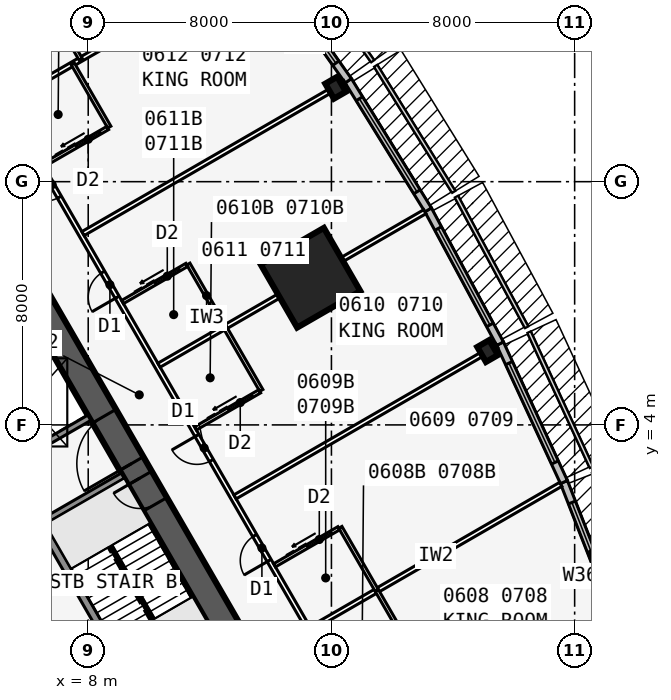
"""IFC4 building model, lengths in metres.
Left out: names, types, materials, properties, quantities, classifications, styles, units other than length and angle.
Written with IfcOpenShell. Run it as: python <this file> out.ifc"""

import sys

from ifc_helpers import new_model, si_unit, direction, frame, frame_2d, origin, origin_2d, place, context, subcontext, project, spatial, rectangle, i_section, extrude, element, fill, save


model = new_model("IFC4")
c1 = context("Model", 3, precision=1e-05, world=origin(), true_north=direction((0.0, 1.0)))
c2 = subcontext(c1, "Body", "Model", "MODEL_VIEW")
j1 = project(units=[si_unit("LENGTHUNIT", "METRE"), si_unit("PLANEANGLEUNIT", "RADIAN")], contexts=[c1])
p1 = place(None, origin())
s1 = spatial("IfcSite", under=j1, at=p1, CompositionType="ELEMENT")
p2 = place(p1, origin())
s2 = spatial("IfcBuilding", under=s1, at=p2, CompositionType="ELEMENT")
p3 = place(p2, frame((0.0, 0.0, 31.9)))
s3 = spatial("IfcBuildingStorey", under=s2, at=p3, CompositionType="ELEMENT", Elevation=31.9)
p4 = place(p3, frame((16.5, -9.526, 0.0), z_axis=(0.0, 0.0, 1.0), x_axis=(-0.499999749417, 0.866025548458, 0.0)))
e1 = element("IfcWall", 1, at=p4, inside=s3, PredefinedType="SHEAR", context=c2, shape_type="SweptSolid", body=[
    extrude(rectangle(XDim=33.0, YDim=0.9, at=frame_2d((16.5, 0.0))), origin(), (0.0, 0.0, 1.0), 3.4),
])
p5 = place(p4, frame((14.15, 0.0, 0.0)))
e2 = element("IfcOpeningElement", 2, at=p5, cuts=e1, PredefinedType="OPENING", context=c2, shape_type="SweptSolid", body=[
    extrude(rectangle(XDim=1.8, YDim=2.13, at=frame_2d((0.9, 1.065))), frame((0.0, 0.46, 0.0), z_axis=(0.0, -1.0, 0.0), x_axis=(1.0, 0.0, 0.0)), (0.0, 0.0, 1.0), 0.92),
])
p6 = place(p4, frame((12.6, 0.0, 0.0)))
e3 = element("IfcOpeningElement", 3, at=p6, cuts=e1, PredefinedType="OPENING", context=c2, shape_type="SweptSolid", body=[
    extrude(rectangle(XDim=1.0, YDim=2.13, at=frame_2d((0.5, 1.065))), frame((0.0, 0.46, 0.0), z_axis=(0.0, -1.0, 0.0), x_axis=(1.0, 0.0, 0.0)), (0.0, 0.0, 1.0), 0.92),
])
p7 = place(p3, frame((10.245, -5.843, 0.0), z_axis=(0.0, 0.0, 1.0), x_axis=(-0.499993009313, 0.866029439822, 0.0)))
e4 = element("IfcWall", 4, at=p7, inside=s3, PredefinedType="SOLIDWALL", context=c2, shape_type="SweptSolid", body=[
    extrude(rectangle(XDim=7.733, YDim=0.25, at=frame_2d((3.866, 0.0))), origin(), (0.0, 0.0, 1.0), 3.235),
])
for number, where, z_axis, x_axis in (
    (5, (6.429, 0.767, 0.0), (0.0, 0.0, 1.0), (0.866, 0.5, 0.0)),
    (6, (5.329, 2.673, 0.0), (0.0, 0.0, 1.0), (0.866, 0.5, 0.0)),
):
    element("IfcWall", number, at=place(p3, frame(where, z_axis=z_axis, x_axis=x_axis)), inside=s3, PredefinedType="SOLIDWALL", context=c2, shape_type="SweptSolid", body=[
        extrude(rectangle(XDim=3.125, YDim=0.2, at=frame_2d((1.562, 0.0))), origin(), (0.0, 0.0, 1.0), 3.235),
    ])
for number, where, z_axis, x_axis in (
    (7, (21.137, 6.43, 0.0), (0.0, 0.0, 1.0), (0.866, 0.5, 0.0)),
    (8, (16.137, 15.09, 0.0), (0.0, 0.0, 1.0), (0.866, 0.5, 0.0)),
):
    element("IfcColumn", number, at=place(p3, frame(where, z_axis=z_axis, x_axis=x_axis)), inside=s3, PredefinedType="COLUMN", context=c2, shape_type="SweptSolid", body=[
        extrude(i_section(OverallWidth=0.455, OverallDepth=0.569, WebThickness=0.078, FlangeThickness=0.125, at=origin_2d()), origin(), (0.0, 0.0, 1.0), 3.4),
    ])
p8 = place(p3, frame((15.312, 8.84, 0.0), z_axis=(0.0, 0.0, 1.0), x_axis=(0.866025403784, 0.5, 0.0)))
e9 = element("IfcColumn", 9, at=p8, inside=s3, PredefinedType="COLUMN", context=c2, shape_type="SweptSolid", body=[
    extrude(rectangle(XDim=2.4, YDim=2.4, at=origin_2d()), origin(), (0.0, 0.0, 1.0), 3.4),
])
p9 = place(p3, frame((25.486, -2.584, 0.0), z_axis=(0.0, 0.0, 1.0), x_axis=(-0.364013463868, 0.931393685894, 0.0)))
e10 = element("IfcWall", 10, at=p9, inside=s3, PredefinedType="STANDARD", context=c2, shape_type="SweptSolid", body=[
    extrude(rectangle(XDim=5.058, YDim=0.25, at=frame_2d((2.529, 0.0))), origin(), (0.0, 0.0, 1.0), 3.235),
])
p10 = place(p9, frame((0.729, 0.0, 0.45)))
e11 = element("IfcOpeningElement", 11, at=p10, cuts=e10, PredefinedType="OPENING", context=c2, shape_type="SweptSolid", body=[
    extrude(rectangle(XDim=3.6, YDim=2.4, at=frame_2d((1.8, 1.2))), frame((0.0, 0.135, 0.0), z_axis=(0.0, -1.0, 0.0), x_axis=(1.0, 0.0, 0.0)), (0.0, 0.0, 1.0), 0.27),
])
p11 = place(p3, frame((23.648, 2.119, 0.0), z_axis=(0.0, 0.0, 1.0), x_axis=(-0.419203100754, 0.907892482796, 0.0)))
e12 = element("IfcWall", 12, at=p11, inside=s3, PredefinedType="STANDARD", context=c2, shape_type="SweptSolid", body=[
    extrude(rectangle(XDim=5.021, YDim=0.25, at=frame_2d((2.51, 0.0))), origin(), (0.0, 0.0, 1.0), 3.235),
])
p12 = place(p11, frame((0.71, 0.0, 0.45)))
e13 = element("IfcOpeningElement", 13, at=p12, cuts=e12, PredefinedType="OPENING", context=c2, shape_type="SweptSolid", body=[
    extrude(rectangle(XDim=3.6, YDim=2.4, at=frame_2d((1.8, 1.2))), frame((0.0, 0.135, 0.0), z_axis=(0.0, -1.0, 0.0), x_axis=(1.0, 0.0, 0.0)), (0.0, 0.0, 1.0), 0.27),
])
p13 = place(p3, frame((21.547, 6.671, 0.0), z_axis=(0.0, 0.0, 1.0), x_axis=(-0.473412820489, 0.880840678782, 0.0)))
e14 = element("IfcWall", 14, at=p13, inside=s3, PredefinedType="STANDARD", context=c2, shape_type="SweptSolid", body=[
    extrude(rectangle(XDim=5.002, YDim=0.25, at=frame_2d((2.501, 0.0))), origin(), (0.0, 0.0, 1.0), 3.235),
])
p14 = place(p13, frame((0.701, 0.0, 0.45)))
e15 = element("IfcOpeningElement", 15, at=p14, cuts=e14, PredefinedType="OPENING", context=c2, shape_type="SweptSolid", body=[
    extrude(rectangle(XDim=3.6, YDim=2.4, at=frame_2d((1.8, 1.2))), frame((0.0, 0.135, 0.0), z_axis=(0.0, -1.0, 0.0), x_axis=(1.0, 0.0, 0.0)), (0.0, 0.0, 1.0), 0.27),
])
p15 = place(p3, frame((19.182, 11.071, 0.0), z_axis=(0.0, 0.0, 1.0), x_axis=(-0.526132807704, 0.850402415717, 0.0)))
e16 = element("IfcWall", 16, at=p15, inside=s3, PredefinedType="STANDARD", context=c2, shape_type="SweptSolid", body=[
    extrude(rectangle(XDim=5.002, YDim=0.25, at=frame_2d((2.501, 0.0))), origin(), (0.0, 0.0, 1.0), 3.235),
])
p16 = place(p15, frame((0.701, 0.0, 0.45)))
e17 = element("IfcOpeningElement", 17, at=p16, cuts=e16, PredefinedType="OPENING", context=c2, shape_type="SweptSolid", body=[
    extrude(rectangle(XDim=3.6, YDim=2.4, at=frame_2d((1.8, 1.2))), frame((0.0, 0.135, 0.0), z_axis=(0.0, -1.0, 0.0), x_axis=(1.0, 0.0, 0.0)), (0.0, 0.0, 1.0), 0.27),
])
p17 = place(p3, frame((16.555, 15.318, 0.0), z_axis=(0.0, 0.0, 1.0), x_axis=(-0.5766431066, 0.81699616132, 0.0)))
e18 = element("IfcWall", 18, at=p17, inside=s3, PredefinedType="STANDARD", context=c2, shape_type="SweptSolid", body=[
    extrude(rectangle(XDim=5.021, YDim=0.25, at=frame_2d((2.51, 0.0))), origin(), (0.0, 0.0, 1.0), 3.235),
])
p18 = place(p17, frame((0.71, 0.0, 0.45)))
e19 = element("IfcOpeningElement", 19, at=p18, cuts=e18, PredefinedType="OPENING", context=c2, shape_type="SweptSolid", body=[
    extrude(rectangle(XDim=3.6, YDim=2.4, at=frame_2d((1.8, 1.2))), frame((0.0, 0.135, 0.0), z_axis=(0.0, -1.0, 0.0), x_axis=(1.0, 0.0, 0.0)), (0.0, 0.0, 1.0), 0.27),
])
p19 = place(p3, frame((20.027, -10.985, 0.0), z_axis=(0.0, 0.0, 1.0), x_axis=(-0.500001677587, 0.866024435227, 0.0)))
e20 = element("IfcWall", 20, at=p19, inside=s3, PredefinedType="PARTITIONING", context=c2, shape_type="SweptSolid", body=[
    extrude(rectangle(XDim=39.054, YDim=0.15, at=frame_2d((19.527, 0.0))), origin(), (0.0, 0.0, 1.0), 3.235),
])
p20 = place(p19, frame((0.352, 0.0, 0.0)))
e21 = element("IfcOpeningElement", 21, at=p20, cuts=e20, PredefinedType="OPENING", context=c2, shape_type="SweptSolid", body=[
    extrude(rectangle(XDim=0.95, YDim=2.13, at=frame_2d((0.475, 1.065))), frame((0.0, 0.085, 0.0), z_axis=(0.0, -1.0, 0.0), x_axis=(1.0, 0.0, 0.0)), (0.0, 0.0, 1.0), 0.17),
])
p21 = place(p19, frame((5.952, 0.0, 0.0)))
e22 = element("IfcOpeningElement", 22, at=p21, cuts=e20, PredefinedType="OPENING", context=c2, shape_type="SweptSolid", body=[
    extrude(rectangle(XDim=0.95, YDim=2.13, at=frame_2d((0.475, 1.065))), frame((0.0, 0.085, 0.0), z_axis=(0.0, -1.0, 0.0), x_axis=(1.0, 0.0, 0.0)), (0.0, 0.0, 1.0), 0.17),
])
p22 = place(p19, frame((12.152, 0.0, 0.0)))
e23 = element("IfcOpeningElement", 23, at=p22, cuts=e20, PredefinedType="OPENING", context=c2, shape_type="SweptSolid", body=[
    extrude(rectangle(XDim=0.95, YDim=2.13, at=frame_2d((0.475, 1.065))), frame((0.0, 0.085, 0.0), z_axis=(0.0, -1.0, 0.0), x_axis=(1.0, 0.0, 0.0)), (0.0, 0.0, 1.0), 0.17),
])
p23 = place(p19, frame((15.952, 0.0, 0.0)))
e24 = element("IfcOpeningElement", 24, at=p23, cuts=e20, PredefinedType="OPENING", context=c2, shape_type="SweptSolid", body=[
    extrude(rectangle(XDim=0.95, YDim=2.13, at=frame_2d((0.475, 1.065))), frame((0.0, 0.085, 0.0), z_axis=(0.0, -1.0, 0.0), x_axis=(1.0, 0.0, 0.0)), (0.0, 0.0, 1.0), 0.17),
])
p24 = place(p19, frame((22.152, 0.0, 0.0)))
e25 = element("IfcOpeningElement", 25, at=p24, cuts=e20, PredefinedType="OPENING", context=c2, shape_type="SweptSolid", body=[
    extrude(rectangle(XDim=0.95, YDim=2.13, at=frame_2d((0.475, 1.065))), frame((0.0, 0.085, 0.0), z_axis=(0.0, -1.0, 0.0), x_axis=(1.0, 0.0, 0.0)), (0.0, 0.0, 1.0), 0.17),
])
p25 = place(p19, frame((25.952, 0.0, 0.0)))
e26 = element("IfcOpeningElement", 26, at=p25, cuts=e20, PredefinedType="OPENING", context=c2, shape_type="SweptSolid", body=[
    extrude(rectangle(XDim=0.95, YDim=2.13, at=frame_2d((0.475, 1.065))), frame((0.0, 0.085, 0.0), z_axis=(0.0, -1.0, 0.0), x_axis=(1.0, 0.0, 0.0)), (0.0, 0.0, 1.0), 0.17),
])
p26 = place(p19, frame((36.546, 0.0, 0.0)))
e27 = element("IfcOpeningElement", 27, at=p26, cuts=e20, PredefinedType="OPENING", context=c2, shape_type="SweptSolid", body=[
    extrude(rectangle(XDim=0.95, YDim=2.13, at=frame_2d((0.475, 1.065))), frame((0.0, 0.085, 0.0), z_axis=(0.0, -1.0, 0.0), x_axis=(1.0, 0.0, 0.0)), (0.0, 0.0, 1.0), 0.17),
])
p27 = place(p3, frame((15.329, -2.697, 0.0), z_axis=(0.0, 0.0, 1.0), x_axis=(0.866018409083, 0.500012114982, 0.0)))
e28 = element("IfcWall", 28, at=p27, inside=s3, PredefinedType="PARTITIONING", context=c2, shape_type="SweptSolid", body=[
    extrude(rectangle(XDim=9.485, YDim=0.15, at=frame_2d((4.742, 0.0))), origin(), (0.0, 0.0, 1.0), 2.389),
])
p28 = place(p3, frame((12.829, 1.633, 0.0), z_axis=(0.0, 0.0, 1.0), x_axis=(0.866026934769, 0.499997348248, 0.0)))
e29 = element("IfcWall", 29, at=p28, inside=s3, PredefinedType="PARTITIONING", context=c2, shape_type="SweptSolid", body=[
    extrude(rectangle(XDim=9.943, YDim=0.15, at=frame_2d((4.971, 0.0))), origin(), (0.0, 0.0, 1.0), 2.389),
])
p29 = place(p3, frame((10.329, 5.963, 0.0), z_axis=(0.0, 0.0, 1.0), x_axis=(0.866021688545, 0.500006434927, 0.0)))
e30 = element("IfcWall", 30, at=p29, inside=s3, PredefinedType="PARTITIONING", context=c2, shape_type="SweptSolid", body=[
    extrude(rectangle(XDim=10.096, YDim=0.15, at=frame_2d((5.048, 0.0))), origin(), (0.0, 0.0, 1.0), 2.389),
])
p30 = place(p3, frame((7.829, 10.293, 0.0), z_axis=(0.0, 0.0, 1.0), x_axis=(0.866016302457, 0.50001576363, 0.0)))
e31 = element("IfcWall", 31, at=p30, inside=s3, PredefinedType="PARTITIONING", context=c2, shape_type="SweptSolid", body=[
    extrude(rectangle(XDim=9.943, YDim=0.15, at=frame_2d((4.972, 0.0))), origin(), (0.0, 0.0, 1.0), 2.389),
])
p31 = place(p3, frame((5.329, 14.623, 0.0), z_axis=(0.0, 0.0, 1.0), x_axis=(0.866018409083, 0.500012114982, 0.0)))
e32 = element("IfcWall", 32, at=p31, inside=s3, PredefinedType="PARTITIONING", context=c2, shape_type="SweptSolid", body=[
    extrude(rectangle(XDim=9.485, YDim=0.15, at=frame_2d((4.742, 0.0))), origin(), (0.0, 0.0, 1.0), 2.389),
])
p32 = place(p3, frame((18.694, -3.526, 0.0), z_axis=(0.0, 0.0, 1.0), x_axis=(-0.500033551112, 0.866006032174, 0.0)))
e33 = element("IfcWall", 33, at=p32, inside=s3, PredefinedType="PLUMBINGWALL", context=c2, shape_type="SweptSolid", body=[
    extrude(rectangle(XDim=2.4, YDim=0.12, at=frame_2d((1.2, 0.0))), origin(), (0.0, 0.0, 1.0), 3.235),
])
p33 = place(p3, frame((17.493, -1.447, 0.0), z_axis=(0.0, 0.0, 1.0), x_axis=(-0.500001309137, 0.866024647952, 0.0)))
e34 = element("IfcWall", 34, at=p33, inside=s3, PredefinedType="PLUMBINGWALL", context=c2, shape_type="SweptSolid", body=[
    extrude(rectangle(XDim=2.4, YDim=0.12, at=frame_2d((1.2, 0.0))), origin(), (0.0, 0.0, 1.0), 3.235),
])
p34 = place(p3, frame((14.128, -0.619, 0.0), z_axis=(0.0, 0.0, 1.0), x_axis=(0.866048967903, 0.499959183527, 0.0)))
e35 = element("IfcWall", 35, at=p34, inside=s3, PredefinedType="PLUMBINGWALL", context=c2, shape_type="SweptSolid", body=[
    extrude(rectangle(XDim=2.44, YDim=0.12, at=frame_2d((1.22, 0.0))), origin(), (0.0, 0.0, 1.0), 3.235),
])
p35 = place(p34, frame((1.25, 0.0, 0.0)))
e36 = element("IfcOpeningElement", 36, at=p35, cuts=e35, PredefinedType="OPENING", context=c2, shape_type="SweptSolid", body=[
    extrude(rectangle(XDim=0.9, YDim=2.13, at=frame_2d((0.45, 1.065))), frame((0.0, 0.07, 0.0), z_axis=(0.0, -1.0, 0.0), x_axis=(1.0, 0.0, 0.0)), (0.0, 0.0, 1.0), 0.14),
])
p36 = place(p3, frame((13.694, 5.135, 0.0), z_axis=(0.0, 0.0, 1.0), x_axis=(-0.500077600433, 0.865980596518, 0.0)))
e37 = element("IfcWall", 37, at=p36, inside=s3, PredefinedType="PLUMBINGWALL", context=c2, shape_type="SweptSolid", body=[
    extrude(rectangle(XDim=2.4, YDim=0.12, at=frame_2d((1.2, 0.0))), origin(), (0.0, 0.0, 1.0), 3.235),
])
p37 = place(p3, frame((11.529, 3.885, 0.0), z_axis=(0.0, 0.0, 1.0), x_axis=(0.866023955769, 0.500002508028, 0.0)))
e38 = element("IfcWall", 38, at=p37, inside=s3, PredefinedType="PLUMBINGWALL", context=c2, shape_type="SweptSolid", body=[
    extrude(rectangle(XDim=2.44, YDim=0.12, at=frame_2d((1.22, 0.0))), origin(), (0.0, 0.0, 1.0), 3.235),
])
p38 = place(p37, frame((1.25, 0.0, 0.0)))
e39 = element("IfcOpeningElement", 39, at=p38, cuts=e38, PredefinedType="OPENING", context=c2, shape_type="SweptSolid", body=[
    extrude(rectangle(XDim=0.9, YDim=2.13, at=frame_2d((0.45, 1.065))), frame((0.0, 0.07, 0.0), z_axis=(0.0, -1.0, 0.0), x_axis=(1.0, 0.0, 0.0)), (0.0, 0.0, 1.0), 0.14),
])
p39 = place(p3, frame((12.493, 7.213, 0.0), z_axis=(0.0, 0.0, 1.0), x_axis=(-0.500001309137, 0.866024647952, 0.0)))
e40 = element("IfcWall", 40, at=p39, inside=s3, PredefinedType="PLUMBINGWALL", context=c2, shape_type="SweptSolid", body=[
    extrude(rectangle(XDim=2.4, YDim=0.12, at=frame_2d((1.2, 0.0))), origin(), (0.0, 0.0, 1.0), 3.235),
])
p40 = place(p3, frame((9.128, 8.042, 0.0), z_axis=(0.0, 0.0, 1.0), x_axis=(0.866005645448, 0.500034220881, 0.0)))
e41 = element("IfcWall", 41, at=p40, inside=s3, PredefinedType="PLUMBINGWALL", context=c2, shape_type="SweptSolid", body=[
    extrude(rectangle(XDim=2.44, YDim=0.12, at=frame_2d((1.22, 0.0))), origin(), (0.0, 0.0, 1.0), 3.235),
])
p41 = place(p40, frame((1.25, 0.0, 0.0)))
e42 = element("IfcOpeningElement", 42, at=p41, cuts=e41, PredefinedType="OPENING", context=c2, shape_type="SweptSolid", body=[
    extrude(rectangle(XDim=0.9, YDim=2.13, at=frame_2d((0.45, 1.065))), frame((0.0, 0.07, 0.0), z_axis=(0.0, -1.0, 0.0), x_axis=(1.0, 0.0, 0.0)), (0.0, 0.0, 1.0), 0.14),
])
p42 = place(p3, frame((8.694, 13.795, 0.0), z_axis=(0.0, 0.0, 1.0), x_axis=(-0.500077600433, 0.865980596518, 0.0)))
e43 = element("IfcWall", 43, at=p42, inside=s3, PredefinedType="PLUMBINGWALL", context=c2, shape_type="SweptSolid", body=[
    extrude(rectangle(XDim=2.4, YDim=0.12, at=frame_2d((1.2, 0.0))), origin(), (0.0, 0.0, 1.0), 3.235),
])
p43 = place(p3, frame((6.529, 12.545, 0.0), z_axis=(0.0, 0.0, 1.0), x_axis=(0.866023955769, 0.500002508028, 0.0)))
e44 = element("IfcWall", 44, at=p43, inside=s3, PredefinedType="PLUMBINGWALL", context=c2, shape_type="SweptSolid", body=[
    extrude(rectangle(XDim=2.44, YDim=0.12, at=frame_2d((1.22, 0.0))), origin(), (0.0, 0.0, 1.0), 3.235),
])
p44 = place(p43, frame((1.25, 0.0, 0.0)))
e45 = element("IfcOpeningElement", 45, at=p44, cuts=e44, PredefinedType="OPENING", context=c2, shape_type="SweptSolid", body=[
    extrude(rectangle(XDim=0.9, YDim=2.13, at=frame_2d((0.45, 1.065))), frame((0.0, 0.07, 0.0), z_axis=(0.0, -1.0, 0.0), x_axis=(1.0, 0.0, 0.0)), (0.0, 0.0, 1.0), 0.14),
])
p45 = place(p3, frame((7.753, 16.023, 0.0), z_axis=(0.0, 0.0, 1.0), x_axis=(-0.499990139034, 0.866031096941, 0.0)))
e46 = element("IfcWall", 46, at=p45, inside=s3, PredefinedType="PLUMBINGWALL", context=c2, shape_type="SweptSolid", body=[
    extrude(rectangle(XDim=3.0, YDim=0.12, at=frame_2d((1.5, 0.0))), origin(), (0.0, 0.0, 1.0), 3.235),
])
p46 = place(p3, frame((10.135, -2.401, 0.0), z_axis=(0.0, 0.0, 1.0), x_axis=(-0.499992232847, 0.866029888106, 0.0)))
e47 = element("IfcWall", 47, at=p46, inside=s3, PredefinedType="SOLIDWALL", context=c2, shape_type="SweptSolid", body=[
    extrude(rectangle(XDim=2.794, YDim=0.1, at=frame_2d((1.397, 0.0))), origin(), (0.0, 0.0, 1.0), 3.4),
])
p47 = place(p10, origin())
e48 = element("IfcWindow", 48, at=p47, inside=s3, PartitioningType="SINGLE_PANEL", PredefinedType="WINDOW", context=c2, shape_type="SweptSolid", body=[
    extrude(rectangle(XDim=3.6, YDim=2.4, at=frame_2d((1.8, 1.2))), frame((0.0, 0.03, 0.0), z_axis=(0.0, -1.0, 0.0), x_axis=(1.0, 0.0, 0.0)), (0.0, 0.0, 1.0), 0.06),
])
fill(e11, e48)
p48 = place(p12, origin())
e49 = element("IfcWindow", 49, at=p48, inside=s3, PartitioningType="SINGLE_PANEL", PredefinedType="WINDOW", context=c2, shape_type="SweptSolid", body=[
    extrude(rectangle(XDim=3.6, YDim=2.4, at=frame_2d((1.8, 1.2))), frame((0.0, 0.03, 0.0), z_axis=(0.0, -1.0, 0.0), x_axis=(1.0, 0.0, 0.0)), (0.0, 0.0, 1.0), 0.06),
])
fill(e13, e49)
p49 = place(p14, origin())
e50 = element("IfcWindow", 50, at=p49, inside=s3, PartitioningType="SINGLE_PANEL", PredefinedType="WINDOW", context=c2, shape_type="SweptSolid", body=[
    extrude(rectangle(XDim=3.6, YDim=2.4, at=frame_2d((1.8, 1.2))), frame((0.0, 0.03, 0.0), z_axis=(0.0, -1.0, 0.0), x_axis=(1.0, 0.0, 0.0)), (0.0, 0.0, 1.0), 0.06),
])
fill(e15, e50)
p50 = place(p16, origin())
e51 = element("IfcWindow", 51, at=p50, inside=s3, PartitioningType="SINGLE_PANEL", PredefinedType="WINDOW", context=c2, shape_type="SweptSolid", body=[
    extrude(rectangle(XDim=3.6, YDim=2.4, at=frame_2d((1.8, 1.2))), frame((0.0, 0.03, 0.0), z_axis=(0.0, -1.0, 0.0), x_axis=(1.0, 0.0, 0.0)), (0.0, 0.0, 1.0), 0.06),
])
fill(e17, e51)
p51 = place(p18, origin())
e52 = element("IfcWindow", 52, at=p51, inside=s3, PartitioningType="SINGLE_PANEL", PredefinedType="WINDOW", context=c2, shape_type="SweptSolid", body=[
    extrude(rectangle(XDim=3.6, YDim=2.4, at=frame_2d((1.8, 1.2))), frame((0.0, 0.03, 0.0), z_axis=(0.0, -1.0, 0.0), x_axis=(1.0, 0.0, 0.0)), (0.0, 0.0, 1.0), 0.06),
])
fill(e19, e52)
p52 = place(p35, origin())
e53 = element("IfcDoor", 53, at=p52, inside=s3, OperationType="SLIDING_TO_LEFT", PredefinedType="DOOR", context=c2, shape_type="SweptSolid", body=[
    extrude(rectangle(XDim=0.9, YDim=2.13, at=frame_2d((0.45, 1.065))), frame((0.0, 0.025, 0.0), z_axis=(0.0, -1.0, 0.0), x_axis=(1.0, 0.0, 0.0)), (0.0, 0.0, 1.0), 0.05),
])
fill(e36, e53)
p53 = place(p22, origin())
e54 = element("IfcDoor", 54, at=p53, inside=s3, OperationType="SINGLE_SWING_LEFT", PredefinedType="DOOR", context=c2, shape_type="SweptSolid", body=[
    extrude(rectangle(XDim=0.95, YDim=2.13, at=frame_2d((0.475, 1.065))), frame((0.0, 0.025, 0.0), z_axis=(0.0, -1.0, 0.0), x_axis=(1.0, 0.0, 0.0)), (0.0, 0.0, 1.0), 0.05),
])
fill(e23, e54)
p54 = place(p38, origin())
e55 = element("IfcDoor", 55, at=p54, inside=s3, OperationType="SLIDING_TO_LEFT", PredefinedType="DOOR", context=c2, shape_type="SweptSolid", body=[
    extrude(rectangle(XDim=0.9, YDim=2.13, at=frame_2d((0.45, 1.065))), frame((0.0, 0.025, 0.0), z_axis=(0.0, -1.0, 0.0), x_axis=(1.0, 0.0, 0.0)), (0.0, 0.0, 1.0), 0.05),
])
fill(e39, e55)
p55 = place(p23, origin())
e56 = element("IfcDoor", 56, at=p55, inside=s3, OperationType="SINGLE_SWING_RIGHT", PredefinedType="DOOR", context=c2, shape_type="SweptSolid", body=[
    extrude(rectangle(XDim=0.95, YDim=2.13, at=frame_2d((0.475, 1.065))), frame((0.0, 0.025, 0.0), z_axis=(0.0, -1.0, 0.0), x_axis=(1.0, 0.0, 0.0)), (0.0, 0.0, 1.0), 0.05),
])
fill(e24, e56)
p56 = place(p41, origin())
e57 = element("IfcDoor", 57, at=p56, inside=s3, OperationType="SLIDING_TO_LEFT", PredefinedType="DOOR", context=c2, shape_type="SweptSolid", body=[
    extrude(rectangle(XDim=0.9, YDim=2.13, at=frame_2d((0.45, 1.065))), frame((0.0, 0.025, 0.0), z_axis=(0.0, -1.0, 0.0), x_axis=(1.0, 0.0, 0.0)), (0.0, 0.0, 1.0), 0.05),
])
fill(e42, e57)
p57 = place(p24, origin())
e58 = element("IfcDoor", 58, at=p57, inside=s3, OperationType="SINGLE_SWING_LEFT", PredefinedType="DOOR", context=c2, shape_type="SweptSolid", body=[
    extrude(rectangle(XDim=0.95, YDim=2.13, at=frame_2d((0.475, 1.065))), frame((0.0, 0.025, 0.0), z_axis=(0.0, -1.0, 0.0), x_axis=(1.0, 0.0, 0.0)), (0.0, 0.0, 1.0), 0.05),
])
fill(e25, e58)
p58 = place(p44, origin())
e59 = element("IfcDoor", 59, at=p58, inside=s3, OperationType="SLIDING_TO_LEFT", PredefinedType="DOOR", context=c2, shape_type="SweptSolid", body=[
    extrude(rectangle(XDim=0.9, YDim=2.13, at=frame_2d((0.45, 1.065))), frame((0.0, 0.025, 0.0), z_axis=(0.0, -1.0, 0.0), x_axis=(1.0, 0.0, 0.0)), (0.0, 0.0, 1.0), 0.05),
])
fill(e45, e59)
p59 = place(p25, origin())
e60 = element("IfcDoor", 60, at=p59, inside=s3, OperationType="SINGLE_SWING_RIGHT", PredefinedType="DOOR", context=c2, shape_type="SweptSolid", body=[
    extrude(rectangle(XDim=0.95, YDim=2.13, at=frame_2d((0.475, 1.065))), frame((0.0, 0.025, 0.0), z_axis=(0.0, -1.0, 0.0), x_axis=(1.0, 0.0, 0.0)), (0.0, 0.0, 1.0), 0.05),
])
fill(e26, e60)
p60 = place(p5, origin())
e61 = element("IfcDoor", 61, at=p60, inside=s3, OperationType="DOUBLE_DOOR_SINGLE_SWING", PredefinedType="DOOR", context=c2, shape_type="SweptSolid", body=[
    extrude(rectangle(XDim=1.8, YDim=2.13, at=frame_2d((0.9, 1.065))), frame((0.0, 0.025, 0.0), z_axis=(0.0, -1.0, 0.0), x_axis=(1.0, 0.0, 0.0)), (0.0, 0.0, 1.0), 0.05),
])
fill(e2, e61)
p61 = place(p6, origin())
e62 = element("IfcDoor", 62, at=p61, inside=s3, OperationType="SINGLE_SWING_RIGHT", PredefinedType="DOOR", context=c2, shape_type="SweptSolid", body=[
    extrude(rectangle(XDim=1.0, YDim=2.13, at=frame_2d((0.5, 1.065))), frame((0.0, 0.025, 0.0), z_axis=(0.0, -1.0, 0.0), x_axis=(1.0, 0.0, 0.0)), (0.0, 0.0, 1.0), 0.05),
])
fill(e3, e62)
save(model, sys.argv[1])
